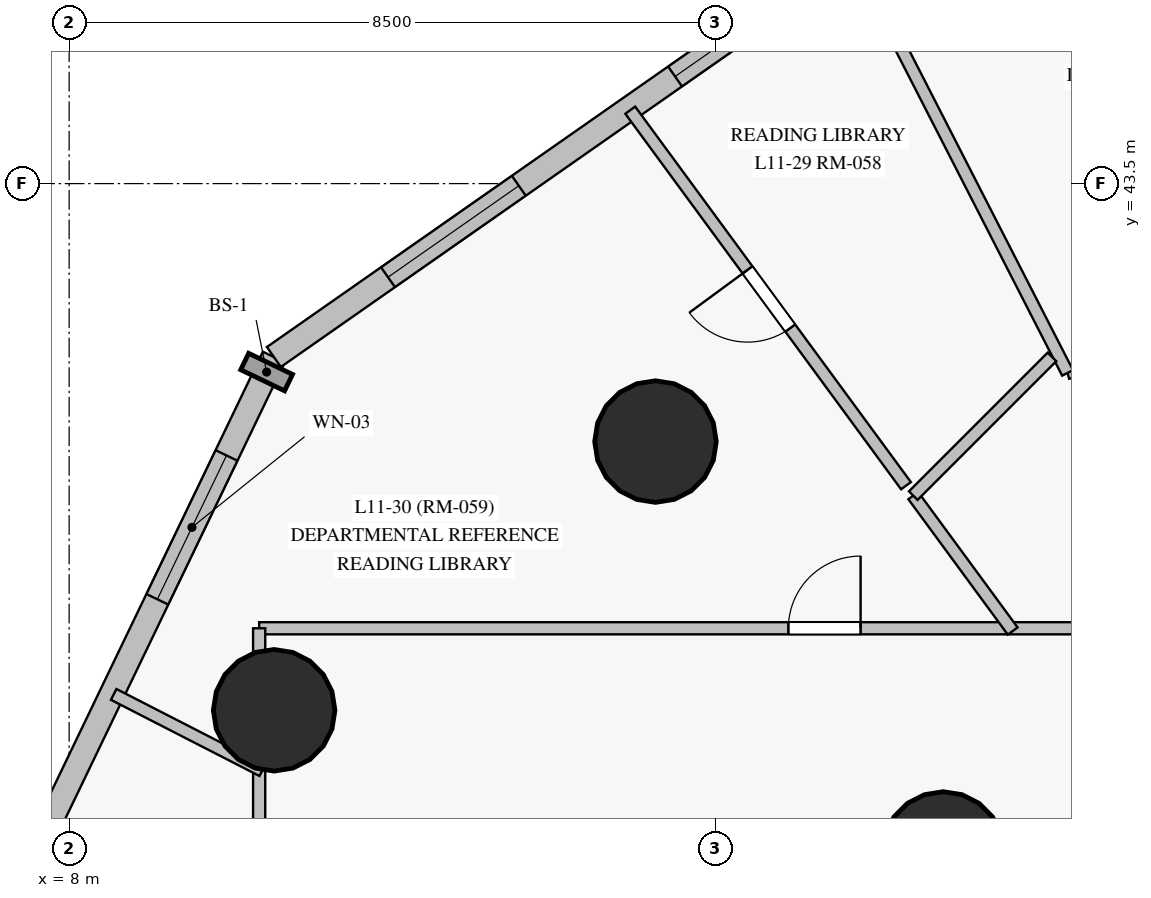
"""IFC4 building model, lengths in metres.
Left out: names, types, materials, properties, quantities, classifications, styles, units other than length and angle.
Written with IfcOpenShell. Run it as: python <this file> out.ifc"""

import sys

from ifc_helpers import new_model, si_unit, direction, frame, frame_2d, origin, origin_with_axes, origin_2d, place, context, subcontext, project, spatial, rectangle, circle, extrude, source, transform, mapped, element, fill, save


model = new_model("IFC4")
c1 = context("Model", 3, precision=1e-05, world=origin(), true_north=direction((0.0, 1.0)))
c2 = subcontext(c1, "Body", "Model", "MODEL_VIEW")
j1 = project(units=[si_unit("LENGTHUNIT", "METRE"), si_unit("PLANEANGLEUNIT", "RADIAN")], contexts=[c1])
p1 = place(None, origin())
s1 = spatial("IfcSite", under=j1, at=p1, CompositionType="ELEMENT")
p2 = place(p1, origin())
s2 = spatial("IfcBuilding", under=s1, at=p2, CompositionType="ELEMENT")
p3 = place(p2, frame((0.0, 0.0, 44.5)))
s3 = spatial("IfcBuildingStorey", under=s2, at=p3, CompositionType="ELEMENT", Elevation=44.5)
m1 = source(origin_with_axes(), c2, "Body", "SweptSolid", [
    extrude(circle(Radius=0.8, at=origin_2d()), origin(), (0.0, 0.0, 1.0), 3.6),
])
for number, where, z_axis, x_axis in (
    (1, (19.5, 34.7, 0.0), (0.0, 0.0, 1.0), (1.0, 0.0, 0.0)),
    (2, (15.714, 40.106, 0.0), (0.0, 0.0, 1.0), (1.0, 0.0, 0.0)),
    (3, (10.697, 36.571, 0.0), (0.0, 0.0, 1.0), (1.0, 0.0, 0.0)),
):
    element("IfcColumn", number, at=place(p3, frame(where, z_axis=z_axis, x_axis=x_axis)), inside=s3, PredefinedType="COLUMN", context=c2, shape_type="MappedRepresentation", body=[
        mapped(m1, transform((0.0, 0.0, 0.0), scale=1.0)),
    ])
p4 = place(p3, frame((10.694, 41.219, 0.0), z_axis=(0.0, 0.0, 1.0), x_axis=(-0.433433173731, -0.901185710001, 0.0)))
e4 = element("IfcWall", 4, at=p4, inside=s3, PredefinedType="SOLIDWALL", context=c2, shape_type="SweptSolid", body=[
    extrude(rectangle(XDim=15.337, YDim=0.32, at=frame_2d((7.669, 0.0))), origin(), (0.0, 0.0, 1.0), 3.35),
])
p5 = place(p4, frame((1.437, 0.0, 0.85)))
e5 = element("IfcOpeningElement", 5, at=p5, cuts=e4, PredefinedType="OPENING", context=c2, shape_type="SweptSolid", body=[
    extrude(rectangle(XDim=2.1, YDim=1.95, at=frame_2d((1.05, 0.975))), frame((0.0, 0.17, 0.0), z_axis=(0.0, -1.0, 0.0), x_axis=(1.0, 0.0, 0.0)), (0.0, 0.0, 1.0), 0.34),
])
p6 = place(p4, frame((7.173, 0.0, 0.85)))
e6 = element("IfcOpeningElement", 6, at=p6, cuts=e4, PredefinedType="OPENING", context=c2, shape_type="SweptSolid", body=[
    extrude(rectangle(XDim=2.1, YDim=1.95, at=frame_2d((1.05, 0.975))), frame((0.0, 0.17, 0.0), z_axis=(0.0, -1.0, 0.0), x_axis=(1.0, 0.0, 0.0)), (0.0, 0.0, 1.0), 0.34),
])
p7 = place(p4, frame((12.354, 0.0, 0.85)))
e7 = element("IfcOpeningElement", 7, at=p7, cuts=e4, PredefinedType="OPENING", context=c2, shape_type="SweptSolid", body=[
    extrude(rectangle(XDim=2.1, YDim=1.95, at=frame_2d((1.05, 0.975))), frame((0.0, 0.17, 0.0), z_axis=(0.0, -1.0, 0.0), x_axis=(1.0, 0.0, 0.0)), (0.0, 0.0, 1.0), 0.34),
])
p8 = place(p3, frame((20.789, 48.278, 0.0), z_axis=(0.0, 0.0, 1.0), x_axis=(-0.819542780698, -0.573018001991, 0.0)))
e8 = element("IfcWall", 8, at=p8, inside=s3, PredefinedType="SOLIDWALL", context=c2, shape_type="SweptSolid", body=[
    extrude(rectangle(XDim=12.319, YDim=0.32, at=frame_2d((6.159, 0.0))), origin(), (0.0, 0.0, 1.0), 3.35),
])
p9 = place(p8, frame((0.501, 0.0, 0.85)))
e9 = element("IfcOpeningElement", 9, at=p9, cuts=e8, PredefinedType="OPENING", context=c2, shape_type="SweptSolid", body=[
    extrude(rectangle(XDim=2.1, YDim=1.95, at=frame_2d((1.05, 0.975))), frame((0.0, 0.17, 0.0), z_axis=(0.0, -1.0, 0.0), x_axis=(1.0, 0.0, 0.0)), (0.0, 0.0, 1.0), 0.34),
])
p10 = place(p8, frame((3.778, 0.0, 0.85)))
e10 = element("IfcOpeningElement", 10, at=p10, cuts=e8, PredefinedType="OPENING", context=c2, shape_type="SweptSolid", body=[
    extrude(rectangle(XDim=2.1, YDim=1.95, at=frame_2d((1.05, 0.975))), frame((0.0, 0.17, 0.0), z_axis=(0.0, -1.0, 0.0), x_axis=(1.0, 0.0, 0.0)), (0.0, 0.0, 1.0), 0.34),
])
p11 = place(p8, frame((8.387, 0.0, 0.85)))
e11 = element("IfcOpeningElement", 11, at=p11, cuts=e8, PredefinedType="OPENING", context=c2, shape_type="SweptSolid", body=[
    extrude(rectangle(XDim=2.1, YDim=1.95, at=frame_2d((1.05, 0.975))), frame((0.0, 0.17, 0.0), z_axis=(0.0, -1.0, 0.0), x_axis=(1.0, 0.0, 0.0)), (0.0, 0.0, 1.0), 0.34),
])
p12 = place(p3, frame((10.5, 37.65, 0.0), z_axis=(0.0, 0.0, 1.0), x_axis=(1.0, 0.0, 0.0)))
e12 = element("IfcWall", 12, at=p12, inside=s3, PredefinedType="PARTITIONING", context=c2, shape_type="SweptSolid", body=[
    extrude(rectangle(XDim=29.75, YDim=0.16, at=frame_2d((14.875, 0.0))), origin(), (0.0, 0.0, 1.0), 2.75),
])
p13 = place(p12, frame((21.927, 0.0, 0.0)))
e13 = element("IfcOpeningElement", 13, at=p13, cuts=e12, PredefinedType="OPENING", context=c2, shape_type="SweptSolid", body=[
    extrude(rectangle(XDim=0.95, YDim=2.15, at=frame_2d((0.475, 1.075))), frame((0.0, 0.09, 0.0), z_axis=(0.0, -1.0, 0.0), x_axis=(1.0, 0.0, 0.0)), (0.0, 0.0, 1.0), 0.18),
])
p14 = place(p12, frame((20.262, 0.0, 0.0)))
e14 = element("IfcOpeningElement", 14, at=p14, cuts=e12, PredefinedType="OPENING", context=c2, shape_type="SweptSolid", body=[
    extrude(rectangle(XDim=0.95, YDim=2.15, at=frame_2d((0.475, 1.075))), frame((0.0, 0.09, 0.0), z_axis=(0.0, -1.0, 0.0), x_axis=(1.0, 0.0, 0.0)), (0.0, 0.0, 1.0), 0.18),
])
p15 = place(p12, frame((18.722, 0.0, 0.0)))
e15 = element("IfcOpeningElement", 15, at=p15, cuts=e12, PredefinedType="OPENING", context=c2, shape_type="SweptSolid", body=[
    extrude(rectangle(XDim=0.95, YDim=2.15, at=frame_2d((0.475, 1.075))), frame((0.0, 0.09, 0.0), z_axis=(0.0, -1.0, 0.0), x_axis=(1.0, 0.0, 0.0)), (0.0, 0.0, 1.0), 0.18),
])
p16 = place(p12, frame((14.4, 0.0, 0.0)))
e16 = element("IfcOpeningElement", 16, at=p16, cuts=e12, PredefinedType="OPENING", context=c2, shape_type="SweptSolid", body=[
    extrude(rectangle(XDim=0.95, YDim=2.15, at=frame_2d((0.475, 1.075))), frame((0.0, 0.09, 0.0), z_axis=(0.0, -1.0, 0.0), x_axis=(1.0, 0.0, 0.0)), (0.0, 0.0, 1.0), 0.18),
])
p17 = place(p12, frame((6.962, 0.0, 0.0)))
e17 = element("IfcOpeningElement", 17, at=p17, cuts=e12, PredefinedType="OPENING", context=c2, shape_type="SweptSolid", body=[
    extrude(rectangle(XDim=0.95, YDim=2.15, at=frame_2d((0.475, 1.075))), frame((0.0, 0.09, 0.0), z_axis=(0.0, -1.0, 0.0), x_axis=(1.0, 0.0, 0.0)), (0.0, 0.0, 1.0), 0.18),
])
p18 = place(p3, frame((10.5, 15.35, 0.0), z_axis=(0.0, 0.0, 1.0), x_axis=(0.0, 1.0, 0.0)))
e18 = element("IfcWall", 18, at=p18, inside=s3, PredefinedType="PARTITIONING", context=c2, shape_type="SweptSolid", body=[
    extrude(rectangle(XDim=22.3, YDim=0.16, at=frame_2d((11.15, 0.0))), origin(), (0.0, 0.0, 1.0), 2.75),
])
p19 = place(p18, frame((10.035, 0.0, 0.0)))
e19 = element("IfcOpeningElement", 19, at=p19, cuts=e18, PredefinedType="OPENING", context=c2, shape_type="SweptSolid", body=[
    extrude(rectangle(XDim=0.95, YDim=2.15, at=frame_2d((0.475, 1.075))), frame((0.0, 0.09, 0.0), z_axis=(0.0, -1.0, 0.0), x_axis=(1.0, 0.0, 0.0)), (0.0, 0.0, 1.0), 0.18),
])
p20 = place(p18, frame((3.031, 0.0, 0.0)))
e20 = element("IfcOpeningElement", 20, at=p20, cuts=e18, PredefinedType="OPENING", context=c2, shape_type="SweptSolid", body=[
    extrude(rectangle(XDim=0.96, YDim=2.15, at=frame_2d((0.48, 1.075))), frame((0.0, 0.09, 0.0), z_axis=(0.0, -1.0, 0.0), x_axis=(1.0, 0.0, 0.0)), (0.0, 0.0, 1.0), 0.18),
])
p21 = place(p18, frame((16.25, 0.0, 0.0)))
e21 = element("IfcOpeningElement", 21, at=p21, cuts=e18, PredefinedType="OPENING", context=c2, shape_type="SweptSolid", body=[
    extrude(rectangle(XDim=0.95, YDim=2.15, at=frame_2d((0.475, 1.075))), frame((0.0, 0.09, 0.0), z_axis=(0.0, -1.0, 0.0), x_axis=(1.0, 0.0, 0.0)), (0.0, 0.0, 1.0), 0.18),
])
p22 = place(p18, frame((12.443, 0.0, 0.0)))
e22 = element("IfcOpeningElement", 22, at=p22, cuts=e18, PredefinedType="OPENING", context=c2, shape_type="SweptSolid", body=[
    extrude(rectangle(XDim=0.95, YDim=2.15, at=frame_2d((0.475, 1.075))), frame((0.0, 0.09, 0.0), z_axis=(0.0, -1.0, 0.0), x_axis=(1.0, 0.0, 0.0)), (0.0, 0.0, 1.0), 0.18),
])
p23 = place(p3, frame((28.812, 43.066, 0.0), z_axis=(0.0, 0.0, 1.0), x_axis=(-0.965922681533, -0.258830781207, 0.0)))
e23 = element("IfcWall", 23, at=p23, inside=s3, PredefinedType="PARTITIONING", context=c2, shape_type="SweptSolid", body=[
    extrude(rectangle(XDim=7.947, YDim=0.16, at=frame_2d((3.973, 0.0))), origin(), (0.0, 0.0, 1.0), 2.75),
])
p24 = place(p3, frame((21.136, 41.01, 0.0), z_axis=(0.0, 0.0, 1.0), x_axis=(-0.455904840593, 0.890028525568, 0.0)))
e24 = element("IfcWall", 24, at=p24, inside=s3, PredefinedType="PARTITIONING", context=c2, shape_type="SweptSolid", body=[
    extrude(rectangle(XDim=6.187, YDim=0.16, at=frame_2d((3.094, 0.0))), origin(), (0.0, 0.0, 1.0), 3.35),
])
p25 = place(p3, frame((19.01, 39.526, 0.0), z_axis=(0.0, 0.0, 1.0), x_axis=(-0.591869476639, 0.806033822257, 0.0)))
e25 = element("IfcWall", 25, at=p25, inside=s3, PredefinedType="PARTITIONING", context=c2, shape_type="SweptSolid", body=[
    extrude(rectangle(XDim=6.13, YDim=0.16, at=frame_2d((3.065, 0.0))), origin(), (0.0, 0.0, 1.0), 3.35),
])
p26 = place(p25, frame((2.572, 0.0, 0.0)))
e26 = element("IfcOpeningElement", 26, at=p26, cuts=e25, PredefinedType="OPENING", context=c2, shape_type="SweptSolid", body=[
    extrude(rectangle(XDim=0.95, YDim=2.15, at=frame_2d((0.475, 1.075))), frame((0.0, 0.09, 0.0), z_axis=(0.0, -1.0, 0.0), x_axis=(1.0, 0.0, 0.0)), (0.0, 0.0, 1.0), 0.18),
])
p27 = place(p3, frame((20.414, 37.614, 0.0), z_axis=(0.0, 0.0, 1.0), x_axis=(-0.591928563028, 0.805990431874, 0.0)))
e27 = element("IfcWall", 27, at=p27, inside=s3, PredefinedType="PARTITIONING", context=c2, shape_type="SweptSolid", body=[
    extrude(rectangle(XDim=2.21, YDim=0.16, at=frame_2d((1.105, 0.0))), origin(), (0.0, 0.0, 1.0), 3.35),
])
p28 = place(p3, frame((10.54, 35.778, 0.0), z_axis=(0.0, 0.0, 1.0), x_axis=(-0.889845240462, 0.456262477119, 0.0)))
e28 = element("IfcWall", 28, at=p28, inside=s3, PredefinedType="PARTITIONING", context=c2, shape_type="SweptSolid", body=[
    extrude(rectangle(XDim=2.196, YDim=0.16, at=frame_2d((1.098, 0.0))), origin(), (0.0, 0.0, 1.0), 3.35),
])
p29 = place(p3, frame((19.105, 39.395, 0.0), z_axis=(0.0, 0.0, 1.0), x_axis=(0.707154080881, 0.707059478328, 0.0)))
e29 = element("IfcWall", 29, at=p29, inside=s3, PredefinedType="PARTITIONING", context=c2, shape_type="SweptSolid", body=[
    extrude(rectangle(XDim=2.581, YDim=0.16, at=frame_2d((1.291, 0.0))), origin(), (0.0, 0.0, 1.0), 2.75),
])
m2 = source(origin_with_axes(), c2, "Body", "SweptSolid", [
    extrude(rectangle(XDim=2.1, YDim=1.95, at=frame_2d((1.05, 0.975))), frame((0.0, 0.03, 0.0), z_axis=(0.0, -1.0, 0.0), x_axis=(1.0, 0.0, 0.0)), (0.0, 0.0, 1.0), 0.06),
])
p30 = place(p5, origin())
e30 = element("IfcWindow", 30, at=p30, inside=s3, PartitioningType="SINGLE_PANEL", PredefinedType="WINDOW", context=c2, shape_type="MappedRepresentation", body=[
    mapped(m2, transform((0.0, 0.0, 0.0), scale=1.0)),
])
fill(e5, e30)
p31 = place(p10, origin())
e31 = element("IfcWindow", 31, at=p31, inside=s3, PartitioningType="SINGLE_PANEL", PredefinedType="WINDOW", context=c2, shape_type="MappedRepresentation", body=[
    mapped(m2, transform((0.0, 0.0, 0.0), scale=1.0)),
])
fill(e10, e31)
p32 = place(p11, origin())
e32 = element("IfcWindow", 32, at=p32, inside=s3, PartitioningType="SINGLE_PANEL", PredefinedType="WINDOW", context=c2, shape_type="MappedRepresentation", body=[
    mapped(m2, transform((0.0, 0.0, 0.0), scale=1.0)),
])
fill(e11, e32)
m3 = source(origin_with_axes(), c2, "Body", "SweptSolid", [
    extrude(rectangle(XDim=0.95, YDim=2.15, at=frame_2d((0.475, 1.075))), frame((0.0, 0.025, 0.0), z_axis=(0.0, -1.0, 0.0), x_axis=(1.0, 0.0, 0.0)), (0.0, 0.0, 1.0), 0.05),
])
p33 = place(p17, origin())
e33 = element("IfcDoor", 33, at=p33, inside=s3, OperationType="SINGLE_SWING_RIGHT", PredefinedType="DOOR", context=c2, shape_type="MappedRepresentation", body=[
    mapped(m3, transform((0.0, 0.0, 0.0), scale=1.0)),
])
fill(e17, e33)
p34 = place(p26, origin())
e34 = element("IfcDoor", 34, at=p34, inside=s3, OperationType="SINGLE_SWING_RIGHT", PredefinedType="DOOR", context=c2, shape_type="MappedRepresentation", body=[
    mapped(m3, transform((0.0, 0.0, 0.0), scale=1.0)),
])
fill(e26, e34)
save(model, sys.argv[1])
